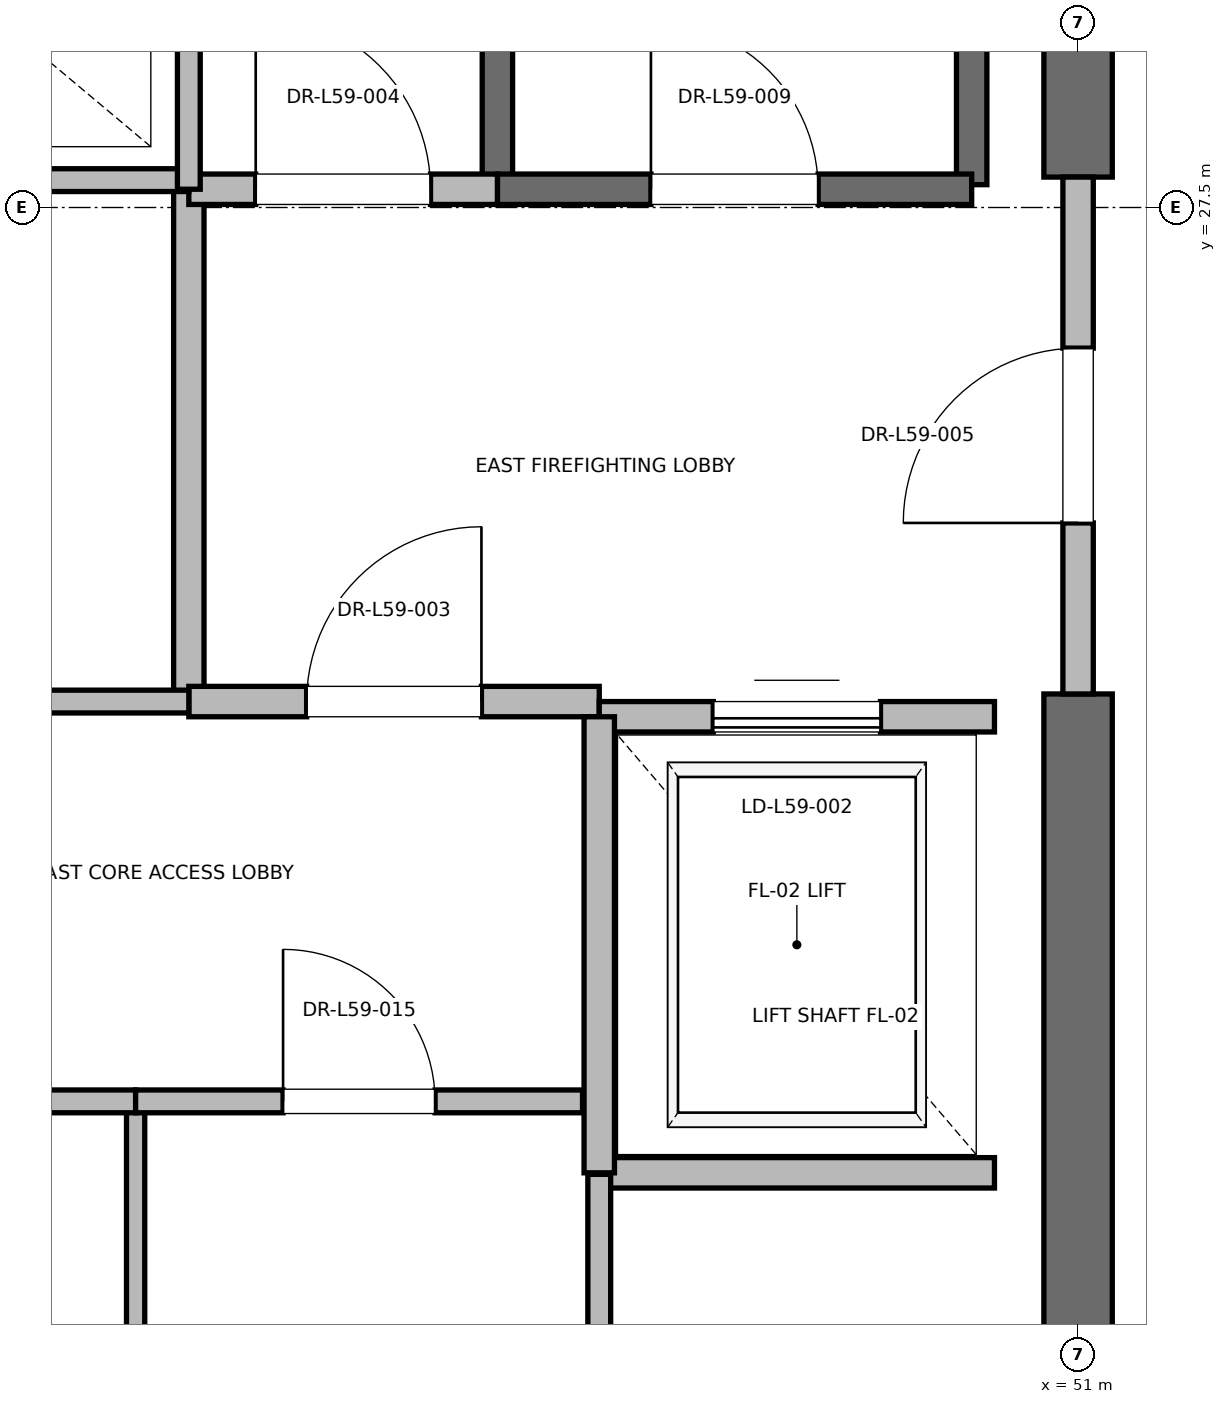
"""IFC4 building model, lengths in metres.
Left out: names, types, materials, properties, quantities, classifications, styles, units other than length and angle.
Written with IfcOpenShell. Run it as: python <this file> out.ifc"""

import sys

from ifc_helpers import new_model, si_unit, direction, frame, frame_2d, origin, place, context, subcontext, project, spatial, rectangle, extrude, element, fill, save


model = new_model("IFC4")
c1 = context("Model", 3, precision=1e-05, world=origin(), true_north=direction((0.0, 1.0)))
c2 = subcontext(c1, "Body", "Model", "MODEL_VIEW")
j1 = project(units=[si_unit("LENGTHUNIT", "METRE"), si_unit("PLANEANGLEUNIT", "RADIAN")], contexts=[c1])
p1 = place(None, origin())
s1 = spatial("IfcSite", under=j1, at=p1, CompositionType="ELEMENT")
p2 = place(p1, origin())
s2 = spatial("IfcBuilding", under=s1, at=p2, CompositionType="ELEMENT")
p3 = place(p2, frame((0.0, 0.0, 255.2)))
s3 = spatial("IfcBuildingStorey", under=s2, at=p3, CompositionType="ELEMENT", Elevation=255.2)
p4 = place(p3, frame((51.0, 18.5, 0.0), z_axis=(0.0, 0.0, 1.0), x_axis=(0.0, 1.0, 0.0)))
e1 = element("IfcWall", 1, at=p4, inside=s3, PredefinedType="SHEAR", context=c2, shape_type="SweptSolid", body=[
    extrude(rectangle(XDim=5.8, YDim=0.45, at=frame_2d((2.9, 0.0))), origin(), (0.0, 0.0, 1.0), 3.785),
])
p5 = place(p3, frame((51.0, 27.7, 0.0), z_axis=(0.0, 0.0, 1.0), x_axis=(0.0, 1.0, 0.0)))
e2 = element("IfcWall", 2, at=p5, inside=s3, PredefinedType="SHEAR", context=c2, shape_type="SweptSolid", body=[
    extrude(rectangle(XDim=8.8, YDim=0.45, at=frame_2d((4.4, 0.0))), origin(), (0.0, 0.0, 1.0), 3.785),
])
p6 = place(p3, frame((50.3, 27.65, 0.0), z_axis=(0.0, 0.0, 1.0), x_axis=(0.0, 1.0, 0.0)))
e3 = element("IfcWall", 3, at=p6, inside=s3, PredefinedType="SOLIDWALL", context=c2, shape_type="SweptSolid", body=[
    extrude(rectangle(XDim=8.15, YDim=0.2, at=frame_2d((4.075, 0.0))), origin(), (0.0, 0.0, 1.0), 3.785),
])
p7 = place(p3, frame((47.18, 27.62, 0.0), z_axis=(0.0, 0.0, 1.0), x_axis=(0.0, 1.0, 0.0)))
e4 = element("IfcWall", 4, at=p7, inside=s3, PredefinedType="SOLIDWALL", context=c2, shape_type="SweptSolid", body=[
    extrude(rectangle(XDim=8.18, YDim=0.2, at=frame_2d((4.09, 0.0))), origin(), (0.0, 0.0, 1.0), 3.785),
])
p8 = place(p3, frame((47.18, 27.62, 0.0), z_axis=(0.0, 0.0, 1.0), x_axis=(1.0, 0.0, 0.0)))
e5 = element("IfcWall", 5, at=p8, inside=s3, PredefinedType="SOLIDWALL", context=c2, shape_type="SweptSolid", body=[
    extrude(rectangle(XDim=3.12, YDim=0.2, at=frame_2d((1.56, 0.0))), origin(), (0.0, 0.0, 1.0), 3.785),
])
p9 = place(p8, frame((1.01, 0.0, 0.0)))
e6 = element("IfcOpeningElement", 6, at=p9, cuts=e5, PredefinedType="OPENING", context=c2, shape_type="SweptSolid", body=[
    extrude(rectangle(XDim=1.1, YDim=2.15, at=frame_2d((0.55, 1.075))), frame((0.0, 0.1, 0.0), z_axis=(0.0, -1.0, 0.0), x_axis=(1.0, 0.0, 0.0)), (0.0, 0.0, 1.0), 0.2),
])
p10 = place(p3, frame((45.15, 24.25, 0.0), z_axis=(0.0, 0.0, 1.0), x_axis=(0.0, 1.0, 0.0)))
e7 = element("IfcWall", 7, at=p10, inside=s3, PredefinedType="PARTITIONING", context=c2, shape_type="SweptSolid", body=[
    extrude(rectangle(XDim=3.37, YDim=0.2, at=frame_2d((1.685, 0.0))), origin(), (0.0, 0.0, 1.0), 3.785),
])
p11 = place(p3, frame((45.15, 24.25, 0.0), z_axis=(0.0, 0.0, 1.0), x_axis=(1.0, 0.0, 0.0)))
e8 = element("IfcWall", 8, at=p11, inside=s3, PredefinedType="PARTITIONING", context=c2, shape_type="SweptSolid", body=[
    extrude(rectangle(XDim=2.7, YDim=0.2, at=frame_2d((1.35, 0.0))), origin(), (0.0, 0.0, 1.0), 3.785),
])
p12 = place(p11, frame((0.775, 0.0, 0.0)))
e9 = element("IfcOpeningElement", 9, at=p12, cuts=e8, PredefinedType="OPENING", context=c2, shape_type="SweptSolid", body=[
    extrude(rectangle(XDim=1.15, YDim=2.2, at=frame_2d((0.575, 1.1))), frame((0.0, 0.1, 0.0), z_axis=(0.0, -1.0, 0.0), x_axis=(1.0, 0.0, 0.0)), (0.0, 0.0, 1.0), 0.2),
])
p13 = place(p3, frame((45.15, 27.62, 0.0), z_axis=(0.0, 0.0, 1.0), x_axis=(1.0, 0.0, 0.0)))
e10 = element("IfcWall", 10, at=p13, inside=s3, PredefinedType="PARTITIONING", context=c2, shape_type="SweptSolid", body=[
    extrude(rectangle(XDim=2.03, YDim=0.2, at=frame_2d((1.015, 0.0))), origin(), (0.0, 0.0, 1.0), 3.785),
])
p14 = place(p13, frame((0.44, 0.0, 0.0)))
e11 = element("IfcOpeningElement", 11, at=p14, cuts=e10, PredefinedType="OPENING", context=c2, shape_type="SweptSolid", body=[
    extrude(rectangle(XDim=1.15, YDim=2.2, at=frame_2d((0.575, 1.1))), frame((0.0, 0.1, 0.0), z_axis=(0.0, -1.0, 0.0), x_axis=(1.0, 0.0, 0.0)), (0.0, 0.0, 1.0), 0.2),
])
p15 = place(p3, frame((51.0, 24.3, 0.0), z_axis=(0.0, 0.0, 1.0), x_axis=(0.0, 1.0, 0.0)))
e12 = element("IfcWall", 12, at=p15, inside=s3, PredefinedType="PARTITIONING", context=c2, shape_type="SweptSolid", body=[
    extrude(rectangle(XDim=3.4, YDim=0.2, at=frame_2d((1.7, 0.0))), origin(), (0.0, 0.0, 1.0), 2.865),
])
p16 = place(p15, frame((1.125, 0.0, 0.0)))
e13 = element("IfcOpeningElement", 13, at=p16, cuts=e12, PredefinedType="OPENING", context=c2, shape_type="SweptSolid", body=[
    extrude(rectangle(XDim=1.15, YDim=2.2, at=frame_2d((0.575, 1.1))), frame((0.0, 0.1, 0.0), z_axis=(0.0, -1.0, 0.0), x_axis=(1.0, 0.0, 0.0)), (0.0, 0.0, 1.0), 0.2),
])
p17 = place(p3, frame((47.85, 21.15, 0.0), z_axis=(0.0, 0.0, 1.0), x_axis=(1.0, 0.0, 0.0)))
e14 = element("IfcWall", 14, at=p17, inside=s3, PredefinedType="SOLIDWALL", context=c2, shape_type="SweptSolid", body=[
    extrude(rectangle(XDim=2.6, YDim=0.2, at=frame_2d((1.3, 0.0))), origin(), (0.0, 0.0, 1.0), 3.785),
])
p18 = place(p3, frame((50.45, 24.15, 0.0), z_axis=(0.0, 0.0, 1.0), x_axis=(-1.0, 0.0, 0.0)))
e15 = element("IfcWall", 15, at=p18, inside=s3, PredefinedType="SOLIDWALL", context=c2, shape_type="SweptSolid", body=[
    extrude(rectangle(XDim=2.6, YDim=0.2, at=frame_2d((1.3, 0.0))), origin(), (0.0, 0.0, 1.0), 2.865),
])
p19 = place(p18, frame((0.75, 0.0, 0.0)))
e16 = element("IfcOpeningElement", 16, at=p19, cuts=e15, PredefinedType="OPENING", context=c2, shape_type="SweptSolid", body=[
    extrude(rectangle(XDim=1.1, YDim=2.2, at=frame_2d((0.55, 1.1))), frame((0.0, 0.1, 0.0), z_axis=(0.0, -1.0, 0.0), x_axis=(1.0, 0.0, 0.0)), (0.0, 0.0, 1.0), 0.2),
])
p20 = place(p3, frame((47.85, 24.15, 0.0), z_axis=(0.0, 0.0, 1.0), x_axis=(0.0, -1.0, 0.0)))
e17 = element("IfcWall", 17, at=p20, inside=s3, PredefinedType="SOLIDWALL", context=c2, shape_type="SweptSolid", body=[
    extrude(rectangle(XDim=3.0, YDim=0.2, at=frame_2d((1.5, 0.0))), origin(), (0.0, 0.0, 1.0), 3.785),
])
p21 = place(p3, frame((41.56, 27.68, 0.0), z_axis=(0.0, 0.0, 1.0), x_axis=(1.0, 0.0, 0.0)))
e18 = element("IfcWall", 18, at=p21, inside=s3, PredefinedType="PARTITIONING", context=c2, shape_type="SweptSolid", body=[
    extrude(rectangle(XDim=3.59, YDim=0.15, at=frame_2d((1.795, 0.0))), origin(), (0.0, 0.0, 1.0), 2.85),
])
p22 = place(p3, frame((47.85, 18.6, 0.0), z_axis=(0.0, 0.0, 1.0), x_axis=(0.0, 1.0, 0.0)))
e19 = element("IfcWall", 19, at=p22, inside=s3, PredefinedType="PARTITIONING", context=c2, shape_type="SweptSolid", body=[
    extrude(rectangle(XDim=2.54, YDim=0.15, at=frame_2d((1.27, 0.0))), origin(), (0.0, 0.0, 1.0), 2.85),
])
p23 = place(p3, frame((44.8, 18.6, 0.0), z_axis=(0.0, 0.0, 1.0), x_axis=(0.0, 1.0, 0.0)))
e20 = element("IfcWall", 20, at=p23, inside=s3, PredefinedType="PARTITIONING", context=c2, shape_type="SweptSolid", body=[
    extrude(rectangle(XDim=3.02, YDim=0.12, at=frame_2d((1.51, 0.0))), origin(), (0.0, 0.0, 1.0), 2.85),
])
p24 = place(p3, frame((41.76, 21.62, 0.0), z_axis=(0.0, 0.0, 1.0), x_axis=(1.0, 0.0, 0.0)))
e21 = element("IfcWall", 21, at=p24, inside=s3, PredefinedType="PARTITIONING", context=c2, shape_type="SweptSolid", body=[
    extrude(rectangle(XDim=3.04, YDim=0.15, at=frame_2d((1.52, 0.0))), origin(), (0.0, 0.0, 1.0), 2.85),
])
p25 = place(p24, frame((1.02, 0.0, 0.0)))
e22 = element("IfcOpeningElement", 22, at=p25, cuts=e21, PredefinedType="OPENING", context=c2, shape_type="SweptSolid", body=[
    extrude(rectangle(XDim=1.0, YDim=2.15, at=frame_2d((0.5, 1.075))), frame((0.0, 0.075, 0.0), z_axis=(0.0, -1.0, 0.0), x_axis=(1.0, 0.0, 0.0)), (0.0, 0.0, 1.0), 0.15),
])
p26 = place(p3, frame((44.8, 21.62, 0.0), z_axis=(0.0, 0.0, 1.0), x_axis=(1.0, 0.0, 0.0)))
e23 = element("IfcWall", 23, at=p26, inside=s3, PredefinedType="PARTITIONING", context=c2, shape_type="SweptSolid", body=[
    extrude(rectangle(XDim=2.94, YDim=0.15, at=frame_2d((1.47, 0.0))), origin(), (0.0, 0.0, 1.0), 2.85),
])
p27 = place(p26, frame((0.97, 0.0, 0.0)))
e24 = element("IfcOpeningElement", 24, at=p27, cuts=e23, PredefinedType="OPENING", context=c2, shape_type="SweptSolid", body=[
    extrude(rectangle(XDim=1.0, YDim=2.15, at=frame_2d((0.5, 1.075))), frame((0.0, 0.075, 0.0), z_axis=(0.0, -1.0, 0.0), x_axis=(1.0, 0.0, 0.0)), (0.0, 0.0, 1.0), 0.15),
])
p28 = place(p3, frame((41.76, 24.25, 0.0), z_axis=(0.0, 0.0, 1.0), x_axis=(1.0, 0.0, 0.0)))
e25 = element("IfcWall", 25, at=p28, inside=s3, PredefinedType="PARTITIONING", context=c2, shape_type="SweptSolid", body=[
    extrude(rectangle(XDim=3.39, YDim=0.15, at=frame_2d((1.695, 0.0))), origin(), (0.0, 0.0, 1.0), 2.85),
])
p29 = place(p28, frame((1.255, 0.0, 0.0)))
e26 = element("IfcOpeningElement", 26, at=p29, cuts=e25, PredefinedType="OPENING", context=c2, shape_type="SweptSolid", body=[
    extrude(rectangle(XDim=0.88, YDim=2.1, at=frame_2d((0.44, 1.05))), frame((0.0, 0.075, 0.0), z_axis=(0.0, -1.0, 0.0), x_axis=(1.0, 0.0, 0.0)), (0.0, 0.0, 1.0), 0.15),
])
p30 = place(p3, frame((45.15, 27.62, 0.0), z_axis=(0.0, 0.0, 1.0), x_axis=(0.0, 1.0, 0.0)))
e27 = element("IfcWall", 27, at=p30, inside=s3, PredefinedType="PARTITIONING", context=c2, shape_type="SweptSolid", body=[
    extrude(rectangle(XDim=3.1, YDim=0.15, at=frame_2d((1.55, 0.0))), origin(), (0.0, 0.0, 1.0), 2.85),
])
p31 = place(p9, origin())
e28 = element("IfcDoor", 28, at=p31, inside=s3, OperationType="SINGLE_SWING_LEFT", PredefinedType="DOOR", context=c2, shape_type="SweptSolid", body=[
    extrude(rectangle(XDim=1.1, YDim=2.15, at=frame_2d((0.55, 1.075))), frame((0.0, 0.025, 0.0), z_axis=(0.0, -1.0, 0.0), x_axis=(1.0, 0.0, 0.0)), (0.0, 0.0, 1.0), 0.05),
])
fill(e6, e28)
p32 = place(p12, origin())
e29 = element("IfcDoor", 29, at=p32, inside=s3, OperationType="SINGLE_SWING_RIGHT", PredefinedType="DOOR", context=c2, shape_type="SweptSolid", body=[
    extrude(rectangle(XDim=1.15, YDim=2.2, at=frame_2d((0.575, 1.1))), frame((0.0, 0.025, 0.0), z_axis=(0.0, -1.0, 0.0), x_axis=(1.0, 0.0, 0.0)), (0.0, 0.0, 1.0), 0.05),
])
fill(e9, e29)
p33 = place(p14, origin())
e30 = element("IfcDoor", 30, at=p33, inside=s3, OperationType="SINGLE_SWING_LEFT", PredefinedType="DOOR", context=c2, shape_type="SweptSolid", body=[
    extrude(rectangle(XDim=1.15, YDim=2.2, at=frame_2d((0.575, 1.1))), frame((0.0, 0.025, 0.0), z_axis=(0.0, -1.0, 0.0), x_axis=(1.0, 0.0, 0.0)), (0.0, 0.0, 1.0), 0.05),
])
fill(e11, e30)
p34 = place(p16, origin())
e31 = element("IfcDoor", 31, at=p34, inside=s3, OperationType="SINGLE_SWING_LEFT", PredefinedType="DOOR", context=c2, shape_type="SweptSolid", body=[
    extrude(rectangle(XDim=1.15, YDim=2.2, at=frame_2d((0.575, 1.1))), frame((0.0, 0.025, 0.0), z_axis=(0.0, -1.0, 0.0), x_axis=(1.0, 0.0, 0.0)), (0.0, 0.0, 1.0), 0.05),
])
fill(e13, e31)
p35 = place(p19, origin())
e32 = element("IfcDoor", 32, at=p35, inside=s3, OperationType="SLIDING_TO_RIGHT", PredefinedType="DOOR", context=c2, shape_type="SweptSolid", body=[
    extrude(rectangle(XDim=1.1, YDim=2.2, at=frame_2d((0.55, 1.1))), frame((0.0, 0.025, 0.0), z_axis=(0.0, -1.0, 0.0), x_axis=(1.0, 0.0, 0.0)), (0.0, 0.0, 1.0), 0.05),
])
fill(e16, e32)
p36 = place(p27, origin())
e33 = element("IfcDoor", 33, at=p36, inside=s3, OperationType="SINGLE_SWING_LEFT", PredefinedType="DOOR", context=c2, shape_type="SweptSolid", body=[
    extrude(rectangle(XDim=1.0, YDim=2.15, at=frame_2d((0.5, 1.075))), frame((0.0, 0.025, 0.0), z_axis=(0.0, -1.0, 0.0), x_axis=(1.0, 0.0, 0.0)), (0.0, 0.0, 1.0), 0.05),
])
fill(e24, e33)
save(model, sys.argv[1])
